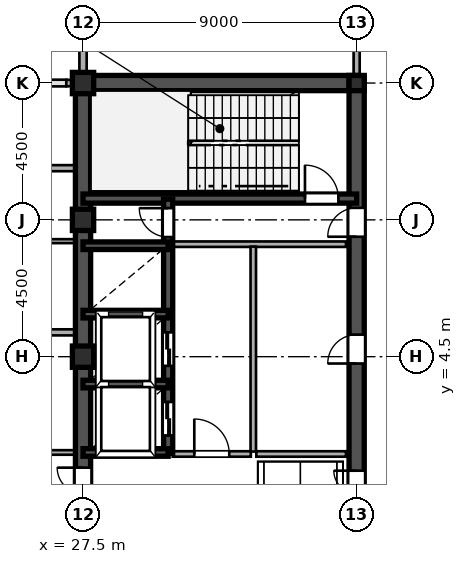
"""IFC4 building model, lengths in metres.
Left out: names, types, materials, properties, quantities, classifications, styles, units other than length and angle.
Written with IfcOpenShell. Run it as: python <this file> out.ifc"""

import sys

from ifc_helpers import new_model, si_unit, direction, frame, frame_2d, origin, origin_2d, place, context, subcontext, project, spatial, rectangle, hollow_rectangle, i_section, extrude, source, transform, mapped, element, fill, save


model = new_model("IFC4")
c1 = context("Model", 3, precision=1e-05, world=origin(), true_north=direction((0.0, 1.0)))
c2 = subcontext(c1, "Body", "Model", "MODEL_VIEW")
j1 = project(units=[si_unit("LENGTHUNIT", "METRE"), si_unit("PLANEANGLEUNIT", "RADIAN")], contexts=[c1])
p1 = place(None, origin())
s1 = spatial("IfcSite", under=j1, at=p1, CompositionType="ELEMENT")
p2 = place(p1, origin())
s2 = spatial("IfcBuilding", under=s1, at=p2, CompositionType="ELEMENT")
p3 = place(p2, frame((0.0, 0.0, 234.6)))
s3 = spatial("IfcBuildingStorey", under=s2, at=p3, CompositionType="ELEMENT", Elevation=234.6)
m1 = source(origin(), c2, "Body", "SweptSolid", [
    extrude(hollow_rectangle(XDim=0.7, YDim=0.7, WallThickness=0.03, at=origin_2d()), origin(), (0.0, 0.0, 1.0), 4.8),
])
for number, where, z_axis, x_axis in (
    (1, (27.5, 4.5, 0.0), (0.0, 0.0, 1.0), (1.0, 0.0, 0.0)),
    (2, (27.5, 9.0, 0.0), (0.0, 0.0, 1.0), (1.0, 0.0, 0.0)),
    (3, (27.5, 13.5, 0.0), (0.0, 0.0, 1.0), (1.0, 0.0, 0.0)),
):
    element("IfcColumn", number, at=place(p3, frame(where, z_axis=z_axis, x_axis=x_axis)), inside=s3, PredefinedType="COLUMN", context=c2, shape_type="MappedRepresentation", body=[
        mapped(m1, transform((0.0, 0.0, 0.0), scale=1.0)),
    ])
m2 = source(origin(), c2, "Body", "SweptSolid", [
    extrude(i_section(OverallWidth=0.5, OverallDepth=0.5, WebThickness=0.02, FlangeThickness=0.032, at=origin_2d()), origin(), (0.0, 0.0, 1.0), 4.8),
])
p4 = place(p3, frame((36.5, 13.5, 0.0), z_axis=(0.0, 0.0, 1.0), x_axis=(1.0, 0.0, 0.0)))
e4 = element("IfcColumn", 4, at=p4, inside=s3, PredefinedType="COLUMN", context=c2, shape_type="MappedRepresentation", body=[
    mapped(m2, transform((0.0, 0.0, 0.0), scale=1.0)),
])
p5 = place(p3, frame((27.5, 13.755, 0.0), z_axis=(0.0, 0.0, 1.0), x_axis=(0.0, 1.0, 0.0)))
e5 = element("IfcWall", 5, at=p5, inside=s3, PredefinedType="SOLIDWALL", context=c2, shape_type="SweptSolid", body=[
    extrude(rectangle(XDim=0.62, YDim=0.24, at=frame_2d((0.31, 0.0))), origin(), (0.0, 0.0, 1.0), 4.08),
])
p6 = place(p3, frame((27.5, 14.375, 0.0), z_axis=(0.0, 0.0, 1.0), x_axis=(0.0, 1.0, 0.0)))
e6 = element("IfcWall", 6, at=p6, inside=s3, PredefinedType="SOLIDWALL", context=c2, shape_type="SweptSolid", body=[
    extrude(rectangle(XDim=1.605, YDim=0.24, at=frame_2d((0.803, 0.0))), origin(), (0.0, 0.0, 1.0), 4.58),
])
p7 = place(p3, frame((26.95, 13.5, 0.0), z_axis=(0.0, 0.0, 1.0), x_axis=(1.0, 0.0, 0.0)))
e7 = element("IfcWall", 7, at=p7, inside=s3, PredefinedType="SOLIDWALL", context=c2, shape_type="SweptSolid", body=[
    extrude(rectangle(XDim=0.54, YDim=0.21, at=frame_2d((0.27, 0.0))), origin(), (0.0, 0.0, 1.0), 2.78),
])
p8 = place(p3, frame((27.5, 1.3, 0.0), z_axis=(0.0, 0.0, 1.0), x_axis=(0.0, 1.0, 0.0)))
e8 = element("IfcWall", 8, at=p8, inside=s3, PredefinedType="SHEAR", context=c2, shape_type="SweptSolid", body=[
    extrude(rectangle(XDim=12.2, YDim=0.5, at=frame_2d((6.1, 0.0))), origin(), (0.0, 0.0, 1.0), 4.58),
])
p9 = place(p3, frame((27.5, -1.3, 0.0), z_axis=(0.0, 0.0, 1.0), x_axis=(0.0, 1.0, 0.0)))
e9 = element("IfcWall", 9, at=p9, inside=s3, PredefinedType="SHEAR", context=c2, shape_type="SweptSolid", body=[
    extrude(rectangle(XDim=2.6, YDim=0.5, at=frame_2d((1.3, 0.0))), origin(), (0.0, 0.0, 1.0), 4.58),
])
p10 = place(p9, frame((0.45, 0.0, 0.0)))
e10 = element("IfcOpeningElement", 10, at=p10, cuts=e9, PredefinedType="OPENING", context=c2, shape_type="SweptSolid", body=[
    extrude(rectangle(XDim=1.7, YDim=2.35, at=frame_2d((0.85, 1.175))), frame((0.0, 0.26, 0.0), z_axis=(0.0, -1.0, 0.0), x_axis=(1.0, 0.0, 0.0)), (0.0, 0.0, 1.0), 0.52),
])
p11 = place(p3, frame((27.5, 13.5, 0.0), z_axis=(0.0, 0.0, 1.0), x_axis=(1.0, 0.0, 0.0)))
e11 = element("IfcWall", 11, at=p11, inside=s3, PredefinedType="SHEAR", context=c2, shape_type="SweptSolid", body=[
    extrude(rectangle(XDim=9.0, YDim=0.5, at=frame_2d((4.5, 0.0))), origin(), (0.0, 0.0, 1.0), 4.58),
])
p12 = place(p3, frame((36.5, -1.3, 0.0), z_axis=(0.0, 0.0, 1.0), x_axis=(0.0, 1.0, 0.0)))
e12 = element("IfcWall", 12, at=p12, inside=s3, PredefinedType="SHEAR", context=c2, shape_type="SweptSolid", body=[
    extrude(rectangle(XDim=2.6, YDim=0.5, at=frame_2d((1.3, 0.0))), origin(), (0.0, 0.0, 1.0), 4.58),
])
p13 = place(p12, frame((0.55, 0.0, 0.0)))
e13 = element("IfcOpeningElement", 13, at=p13, cuts=e12, PredefinedType="OPENING", context=c2, shape_type="SweptSolid", body=[
    extrude(rectangle(XDim=1.5, YDim=2.3, at=frame_2d((0.75, 1.15))), frame((0.0, 0.26, 0.0), z_axis=(0.0, -1.0, 0.0), x_axis=(1.0, 0.0, 0.0)), (0.0, 0.0, 1.0), 0.52),
])
p14 = place(p3, frame((36.5, 8.2, 0.0), z_axis=(0.0, 0.0, 1.0), x_axis=(0.0, 1.0, 0.0)))
e14 = element("IfcWall", 14, at=p14, inside=s3, PredefinedType="SHEAR", context=c2, shape_type="SweptSolid", body=[
    extrude(rectangle(XDim=5.45, YDim=0.5, at=frame_2d((2.725, 0.0))), origin(), (0.0, 0.0, 1.0), 4.58),
])
p15 = place(p14, frame((0.245, 0.0, 0.0)))
e15 = element("IfcOpeningElement", 15, at=p15, cuts=e14, PredefinedType="OPENING", context=c2, shape_type="SweptSolid", body=[
    extrude(rectangle(XDim=0.95, YDim=2.15, at=frame_2d((0.475, 1.075))), frame((0.0, 0.26, 0.0), z_axis=(0.0, -1.0, 0.0), x_axis=(1.0, 0.0, 0.0)), (0.0, 0.0, 1.0), 0.52),
])
p16 = place(p3, frame((36.5, 1.3, 0.0), z_axis=(0.0, 0.0, 1.0), x_axis=(0.0, 1.0, 0.0)))
e16 = element("IfcWall", 16, at=p16, inside=s3, PredefinedType="SHEAR", context=c2, shape_type="SweptSolid", body=[
    extrude(rectangle(XDim=6.9, YDim=0.5, at=frame_2d((3.45, 0.0))), origin(), (0.0, 0.0, 1.0), 4.58),
])
p17 = place(p16, frame((2.975, 0.0, 0.0)))
e17 = element("IfcOpeningElement", 17, at=p17, cuts=e16, PredefinedType="OPENING", context=c2, shape_type="SweptSolid", body=[
    extrude(rectangle(XDim=0.95, YDim=2.15, at=frame_2d((0.475, 1.075))), frame((0.0, 0.26, 0.0), z_axis=(0.0, -1.0, 0.0), x_axis=(1.0, 0.0, 0.0)), (0.0, 0.0, 1.0), 0.52),
])
p18 = place(p3, frame((27.5, 9.7, 0.0), z_axis=(0.0, 0.0, 1.0), x_axis=(1.0, 0.0, 0.0)))
e18 = element("IfcWall", 18, at=p18, inside=s3, PredefinedType="SHEAR", context=c2, shape_type="SweptSolid", body=[
    extrude(rectangle(XDim=9.0, YDim=0.3, at=frame_2d((4.5, 0.0))), origin(), (0.0, 0.0, 1.0), 4.58),
])
p19 = place(p18, frame((7.3, 0.0, 0.0)))
e19 = element("IfcOpeningElement", 19, at=p19, cuts=e18, PredefinedType="OPENING", context=c2, shape_type="SweptSolid", body=[
    extrude(rectangle(XDim=1.1, YDim=2.2, at=frame_2d((0.55, 1.1))), frame((0.0, 0.16, 0.0), z_axis=(0.0, -1.0, 0.0), x_axis=(1.0, 0.0, 0.0)), (0.0, 0.0, 1.0), 0.32),
])
for number, where, z_axis, x_axis in (
    (20, (27.5, 1.35, 0.0), (0.0, 0.0, 1.0), (1.0, 0.0, 0.0)),
    (21, (27.5, 3.6, 0.0), (0.0, 0.0, 1.0), (1.0, 0.0, 0.0)),
    (22, (27.5, 5.9, 0.0), (0.0, 0.0, 1.0), (1.0, 0.0, 0.0)),
    (23, (27.5, 8.15, 0.0), (0.0, 0.0, 1.0), (1.0, 0.0, 0.0)),
):
    element("IfcWall", number, at=place(p3, frame(where, z_axis=z_axis, x_axis=x_axis)), inside=s3, PredefinedType="SHEAR", context=c2, shape_type="SweptSolid", body=[
        extrude(rectangle(XDim=2.8, YDim=0.25, at=frame_2d((1.4, 0.0))), origin(), (0.0, 0.0, 1.0), 4.58),
    ])
p20 = place(p3, frame((30.3, 1.32, 0.0), z_axis=(0.0, 0.0, 1.0), x_axis=(0.0, 1.0, 0.0)))
e24 = element("IfcWall", 24, at=p20, inside=s3, PredefinedType="SHEAR", context=c2, shape_type="SweptSolid", body=[
    extrude(rectangle(XDim=2.28, YDim=0.3, at=frame_2d((1.14, 0.0))), origin(), (0.0, 0.0, 1.0), 4.58),
])
p21 = place(p20, frame((0.59, 0.0, 0.0)))
e25 = element("IfcOpeningElement", 25, at=p21, cuts=e24, PredefinedType="OPENING", context=c2, shape_type="SweptSolid", body=[
    extrude(rectangle(XDim=1.1, YDim=2.2, at=frame_2d((0.55, 1.1))), frame((0.0, 0.16, 0.0), z_axis=(0.0, -1.0, 0.0), x_axis=(1.0, 0.0, 0.0)), (0.0, 0.0, 1.0), 0.32),
])
p22 = place(p3, frame((30.3, 3.6, 0.0), z_axis=(0.0, 0.0, 1.0), x_axis=(0.0, 1.0, 0.0)))
e26 = element("IfcWall", 26, at=p22, inside=s3, PredefinedType="SHEAR", context=c2, shape_type="SweptSolid", body=[
    extrude(rectangle(XDim=2.3, YDim=0.3, at=frame_2d((1.15, 0.0))), origin(), (0.0, 0.0, 1.0), 4.58),
])
p23 = place(p22, frame((0.6, 0.0, 0.0)))
e27 = element("IfcOpeningElement", 27, at=p23, cuts=e26, PredefinedType="OPENING", context=c2, shape_type="SweptSolid", body=[
    extrude(rectangle(XDim=1.1, YDim=2.2, at=frame_2d((0.55, 1.1))), frame((0.0, 0.16, 0.0), z_axis=(0.0, -1.0, 0.0), x_axis=(1.0, 0.0, 0.0)), (0.0, 0.0, 1.0), 0.32),
])
p24 = place(p3, frame((30.3, 5.9, 0.0), z_axis=(0.0, 0.0, 1.0), x_axis=(0.0, 1.0, 0.0)))
e28 = element("IfcWall", 28, at=p24, inside=s3, PredefinedType="SHEAR", context=c2, shape_type="SweptSolid", body=[
    extrude(rectangle(XDim=2.25, YDim=0.3, at=frame_2d((1.125, 0.0))), origin(), (0.0, 0.0, 1.0), 4.58),
])
p25 = place(p3, frame((30.3, 8.15, 0.0), z_axis=(0.0, 0.0, 1.0), x_axis=(0.0, 1.0, 0.0)))
e29 = element("IfcWall", 29, at=p25, inside=s3, PredefinedType="SHEAR", context=c2, shape_type="SweptSolid", body=[
    extrude(rectangle(XDim=1.53, YDim=0.3, at=frame_2d((0.765, 0.0))), origin(), (0.0, 0.0, 1.0), 4.58),
])
p26 = place(p25, frame((0.285, 0.0, 0.0)))
e30 = element("IfcOpeningElement", 30, at=p26, cuts=e29, PredefinedType="OPENING", context=c2, shape_type="SweptSolid", body=[
    extrude(rectangle(XDim=0.95, YDim=2.15, at=frame_2d((0.475, 1.075))), frame((0.0, 0.16, 0.0), z_axis=(0.0, -1.0, 0.0), x_axis=(1.0, 0.0, 0.0)), (0.0, 0.0, 1.0), 0.32),
])
p27 = place(p3, frame((30.45, 8.2, 0.0), z_axis=(0.0, 0.0, 1.0), x_axis=(1.0, 0.0, 0.0)))
e31 = element("IfcWall", 31, at=p27, inside=s3, PredefinedType="PARTITIONING", context=c2, shape_type="SweptSolid", body=[
    extrude(rectangle(XDim=5.7, YDim=0.18, at=frame_2d((2.85, 0.0))), origin(), (0.0, 0.0, 1.0), 4.58),
])
p28 = place(p3, frame((33.1, 1.38, 0.0), z_axis=(0.0, 0.0, 1.0), x_axis=(0.0, 1.0, 0.0)))
e32 = element("IfcWall", 32, at=p28, inside=s3, PredefinedType="PARTITIONING", context=c2, shape_type="SweptSolid", body=[
    extrude(rectangle(XDim=6.74, YDim=0.18, at=frame_2d((3.37, 0.0))), origin(), (0.0, 0.0, 1.0), 4.58),
])
p29 = place(p3, frame((30.45, 1.3, 0.0), z_axis=(0.0, 0.0, 1.0), x_axis=(1.0, 0.0, 0.0)))
e33 = element("IfcWall", 33, at=p29, inside=s3, PredefinedType="PARTITIONING", context=c2, shape_type="SweptSolid", body=[
    extrude(rectangle(XDim=2.57, YDim=0.18, at=frame_2d((1.285, 0.0))), origin(), (0.0, 0.0, 1.0), 4.58),
])
p30 = place(p29, frame((0.71, 0.0, 0.0)))
e34 = element("IfcOpeningElement", 34, at=p30, cuts=e33, PredefinedType="OPENING", context=c2, shape_type="SweptSolid", body=[
    extrude(rectangle(XDim=1.15, YDim=2.2, at=frame_2d((0.575, 1.1))), frame((0.0, 0.1, 0.0), z_axis=(0.0, -1.0, 0.0), x_axis=(1.0, 0.0, 0.0)), (0.0, 0.0, 1.0), 0.2),
])
p31 = place(p3, frame((33.2, 1.3, 0.0), z_axis=(0.0, 0.0, 1.0), x_axis=(1.0, 0.0, 0.0)))
e35 = element("IfcWall", 35, at=p31, inside=s3, PredefinedType="PARTITIONING", context=c2, shape_type="SweptSolid", body=[
    extrude(rectangle(XDim=2.95, YDim=0.18, at=frame_2d((1.475, 0.0))), origin(), (0.0, 0.0, 1.0), 4.58),
])
p32 = place(p3, frame((7.785, 1.35, 0.0), z_axis=(0.0, 0.0, 1.0), x_axis=(1.0, 0.0, 0.0)))
e36 = element("IfcWall", 36, at=p32, inside=s3, PredefinedType="PARTITIONING", context=c2, shape_type="SweptSolid", body=[
    extrude(rectangle(XDim=19.46, YDim=0.15, at=frame_2d((9.73, 0.0))), origin(), (0.0, 0.0, 1.0), 4.58),
])
p33 = place(p32, frame((5.49, 0.0, 0.0)))
e37 = element("IfcOpeningElement", 37, at=p33, cuts=e36, PredefinedType="OPENING", context=c2, shape_type="SweptSolid", body=[
    extrude(rectangle(XDim=0.95, YDim=2.15, at=frame_2d((0.475, 1.075))), frame((0.0, 0.085, 0.0), z_axis=(0.0, -1.0, 0.0), x_axis=(1.0, 0.0, 0.0)), (0.0, 0.0, 1.0), 0.17),
])
p34 = place(p3, frame((-27.245, 5.3, 0.0), z_axis=(0.0, 0.0, 1.0), x_axis=(1.0, 0.0, 0.0)))
e38 = element("IfcWall", 38, at=p34, inside=s3, PredefinedType="PARTITIONING", context=c2, shape_type="SweptSolid", body=[
    extrude(rectangle(XDim=54.49, YDim=0.2, at=frame_2d((27.245, 0.0))), origin(), (0.0, 0.0, 1.0), 4.58),
])
p35 = place(p34, frame((25.77, 0.0, 0.0)))
e39 = element("IfcOpeningElement", 39, at=p35, cuts=e38, PredefinedType="OPENING", context=c2, shape_type="SweptSolid", body=[
    extrude(rectangle(XDim=1.15, YDim=2.2, at=frame_2d((0.575, 1.1))), frame((0.0, 0.11, 0.0), z_axis=(0.0, -1.0, 0.0), x_axis=(1.0, 0.0, 0.0)), (0.0, 0.0, 1.0), 0.22),
])
p36 = place(p34, frame((35.17, 0.0, 0.0)))
e40 = element("IfcOpeningElement", 40, at=p36, cuts=e38, PredefinedType="OPENING", context=c2, shape_type="SweptSolid", body=[
    extrude(rectangle(XDim=1.15, YDim=2.2, at=frame_2d((0.575, 1.1))), frame((0.0, 0.11, 0.0), z_axis=(0.0, -1.0, 0.0), x_axis=(1.0, 0.0, 0.0)), (0.0, 0.0, 1.0), 0.22),
])
p37 = place(p34, frame((17.67, 0.0, 0.0)))
e41 = element("IfcOpeningElement", 41, at=p37, cuts=e38, PredefinedType="OPENING", context=c2, shape_type="SweptSolid", body=[
    extrude(rectangle(XDim=1.15, YDim=2.2, at=frame_2d((0.575, 1.1))), frame((0.0, 0.11, 0.0), z_axis=(0.0, -1.0, 0.0), x_axis=(1.0, 0.0, 0.0)), (0.0, 0.0, 1.0), 0.22),
])
p38 = place(p34, frame((46.055, 0.0, 0.0)))
e42 = element("IfcOpeningElement", 42, at=p38, cuts=e38, PredefinedType="OPENING", context=c2, shape_type="SweptSolid", body=[
    extrude(rectangle(XDim=0.88, YDim=2.1, at=frame_2d((0.44, 1.05))), frame((0.0, 0.11, 0.0), z_axis=(0.0, -1.0, 0.0), x_axis=(1.0, 0.0, 0.0)), (0.0, 0.0, 1.0), 0.22),
])
p39 = place(p34, frame((51.405, 0.0, 0.0)))
e43 = element("IfcOpeningElement", 43, at=p39, cuts=e38, PredefinedType="OPENING", context=c2, shape_type="SweptSolid", body=[
    extrude(rectangle(XDim=0.88, YDim=2.1, at=frame_2d((0.44, 1.05))), frame((0.0, 0.11, 0.0), z_axis=(0.0, -1.0, 0.0), x_axis=(1.0, 0.0, 0.0)), (0.0, 0.0, 1.0), 0.22),
])
p40 = place(p3, frame((16.585, 8.3, 0.0), z_axis=(0.0, 0.0, 1.0), x_axis=(1.0, 0.0, 0.0)))
e44 = element("IfcWall", 44, at=p40, inside=s3, PredefinedType="PARTITIONING", context=c2, shape_type="SweptSolid", body=[
    extrude(rectangle(XDim=10.66, YDim=0.13, at=frame_2d((5.33, 0.0))), origin(), (0.0, 0.0, 1.0), 4.58),
])
p41 = place(p3, frame((-27.245, 10.7, 0.0), z_axis=(0.0, 0.0, 1.0), x_axis=(1.0, 0.0, 0.0)))
e45 = element("IfcWall", 45, at=p41, inside=s3, PredefinedType="PARTITIONING", context=c2, shape_type="SweptSolid", body=[
    extrude(rectangle(XDim=54.49, YDim=0.2, at=frame_2d((27.245, 0.0))), origin(), (0.0, 0.0, 1.0), 4.58),
])
p42 = place(p41, frame((25.77, 0.0, 0.0)))
e46 = element("IfcOpeningElement", 46, at=p42, cuts=e45, PredefinedType="OPENING", context=c2, shape_type="SweptSolid", body=[
    extrude(rectangle(XDim=1.15, YDim=2.2, at=frame_2d((0.575, 1.1))), frame((0.0, 0.11, 0.0), z_axis=(0.0, -1.0, 0.0), x_axis=(1.0, 0.0, 0.0)), (0.0, 0.0, 1.0), 0.22),
])
p43 = place(p3, frame((36.5, 13.755, 0.0), z_axis=(0.0, 0.0, 1.0), x_axis=(0.0, 1.0, 0.0)))
e47 = element("IfcWall", 47, at=p43, inside=s3, PredefinedType="PARTITIONING", context=c2, shape_type="SweptSolid", body=[
    extrude(rectangle(XDim=1.76, YDim=0.2, at=frame_2d((0.88, 0.0))), origin(), (0.0, 0.0, 1.0), 3.98),
])
m3 = source(origin(), c2, "Body", "SweptSolid", [
    extrude(rectangle(XDim=1.7, YDim=2.35, at=frame_2d((0.85, 1.175))), frame((0.0, 0.025, 0.0), z_axis=(0.0, -1.0, 0.0), x_axis=(1.0, 0.0, 0.0)), (0.0, 0.0, 1.0), 0.05),
])
p44 = place(p10, origin())
e48 = element("IfcDoor", 48, at=p44, inside=s3, OperationType="DOUBLE_SWING_LEFT", PredefinedType="DOOR", context=c2, shape_type="MappedRepresentation", body=[
    mapped(m3, transform((0.0, 0.0, 0.0), scale=1.0)),
])
fill(e10, e48)
m4 = source(origin(), c2, "Body", "SweptSolid", [
    extrude(rectangle(XDim=1.5, YDim=2.3, at=frame_2d((0.75, 1.15))), frame((0.0, 0.025, 0.0), z_axis=(0.0, -1.0, 0.0), x_axis=(1.0, 0.0, 0.0)), (0.0, 0.0, 1.0), 0.05),
])
p45 = place(p13, origin())
e49 = element("IfcDoor", 49, at=p45, inside=s3, OperationType="DOUBLE_SWING_LEFT", PredefinedType="DOOR", context=c2, shape_type="MappedRepresentation", body=[
    mapped(m4, transform((0.0, 0.0, 0.0), scale=1.0)),
])
fill(e13, e49)
m5 = source(origin(), c2, "Body", "SweptSolid", [
    extrude(rectangle(XDim=0.95, YDim=2.15, at=frame_2d((0.475, 1.075))), frame((0.0, 0.025, 0.0), z_axis=(0.0, -1.0, 0.0), x_axis=(1.0, 0.0, 0.0)), (0.0, 0.0, 1.0), 0.05),
])
p46 = place(p15, origin())
e50 = element("IfcDoor", 50, at=p46, inside=s3, OperationType="SINGLE_SWING_LEFT", PredefinedType="DOOR", context=c2, shape_type="MappedRepresentation", body=[
    mapped(m5, transform((0.0, 0.0, 0.0), scale=1.0)),
])
fill(e15, e50)
p47 = place(p17, origin())
e51 = element("IfcDoor", 51, at=p47, inside=s3, OperationType="SINGLE_SWING_LEFT", PredefinedType="DOOR", context=c2, shape_type="MappedRepresentation", body=[
    mapped(m5, transform((0.0, 0.0, 0.0), scale=1.0)),
])
fill(e17, e51)
m6 = source(origin(), c2, "Body", "SweptSolid", [
    extrude(rectangle(XDim=1.1, YDim=2.2, at=frame_2d((0.55, 1.1))), frame((0.0, 0.025, 0.0), z_axis=(0.0, -1.0, 0.0), x_axis=(1.0, 0.0, 0.0)), (0.0, 0.0, 1.0), 0.05),
])
p48 = place(p19, origin())
e52 = element("IfcDoor", 52, at=p48, inside=s3, OperationType="SINGLE_SWING_LEFT", PredefinedType="DOOR", context=c2, shape_type="MappedRepresentation", body=[
    mapped(m6, transform((0.0, 0.0, 0.0), scale=1.0)),
])
fill(e19, e52)
m7 = source(origin(), c2, "Body", "SweptSolid", [
    extrude(rectangle(XDim=1.1, YDim=2.2, at=frame_2d((0.55, 1.1))), frame((0.0, 0.025, 0.0), z_axis=(0.0, -1.0, 0.0), x_axis=(1.0, 0.0, 0.0)), (0.0, 0.0, 1.0), 0.05),
])
p49 = place(p21, origin())
e53 = element("IfcDoor", 53, at=p49, inside=s3, OperationType="DOUBLE_DOOR_SLIDING", PredefinedType="DOOR", context=c2, shape_type="MappedRepresentation", body=[
    mapped(m7, transform((0.0, 0.0, 0.0), scale=1.0)),
])
fill(e25, e53)
p50 = place(p23, origin())
e54 = element("IfcDoor", 54, at=p50, inside=s3, OperationType="DOUBLE_DOOR_SLIDING", PredefinedType="DOOR", context=c2, shape_type="MappedRepresentation", body=[
    mapped(m7, transform((0.0, 0.0, 0.0), scale=1.0)),
])
fill(e27, e54)
p51 = place(p26, origin())
e55 = element("IfcDoor", 55, at=p51, inside=s3, OperationType="SINGLE_SWING_RIGHT", PredefinedType="DOOR", context=c2, shape_type="MappedRepresentation", body=[
    mapped(m5, transform((0.0, 0.0, 0.0), scale=1.0)),
])
fill(e30, e55)
m8 = source(origin(), c2, "Body", "SweptSolid", [
    extrude(rectangle(XDim=1.15, YDim=2.2, at=frame_2d((0.575, 1.1))), frame((0.0, 0.025, 0.0), z_axis=(0.0, -1.0, 0.0), x_axis=(1.0, 0.0, 0.0)), (0.0, 0.0, 1.0), 0.05),
])
p52 = place(p30, origin())
e56 = element("IfcDoor", 56, at=p52, inside=s3, OperationType="SINGLE_SWING_LEFT", PredefinedType="DOOR", context=c2, shape_type="MappedRepresentation", body=[
    mapped(m8, transform((0.0, 0.0, 0.0), scale=1.0)),
])
fill(e34, e56)
save(model, sys.argv[1])
